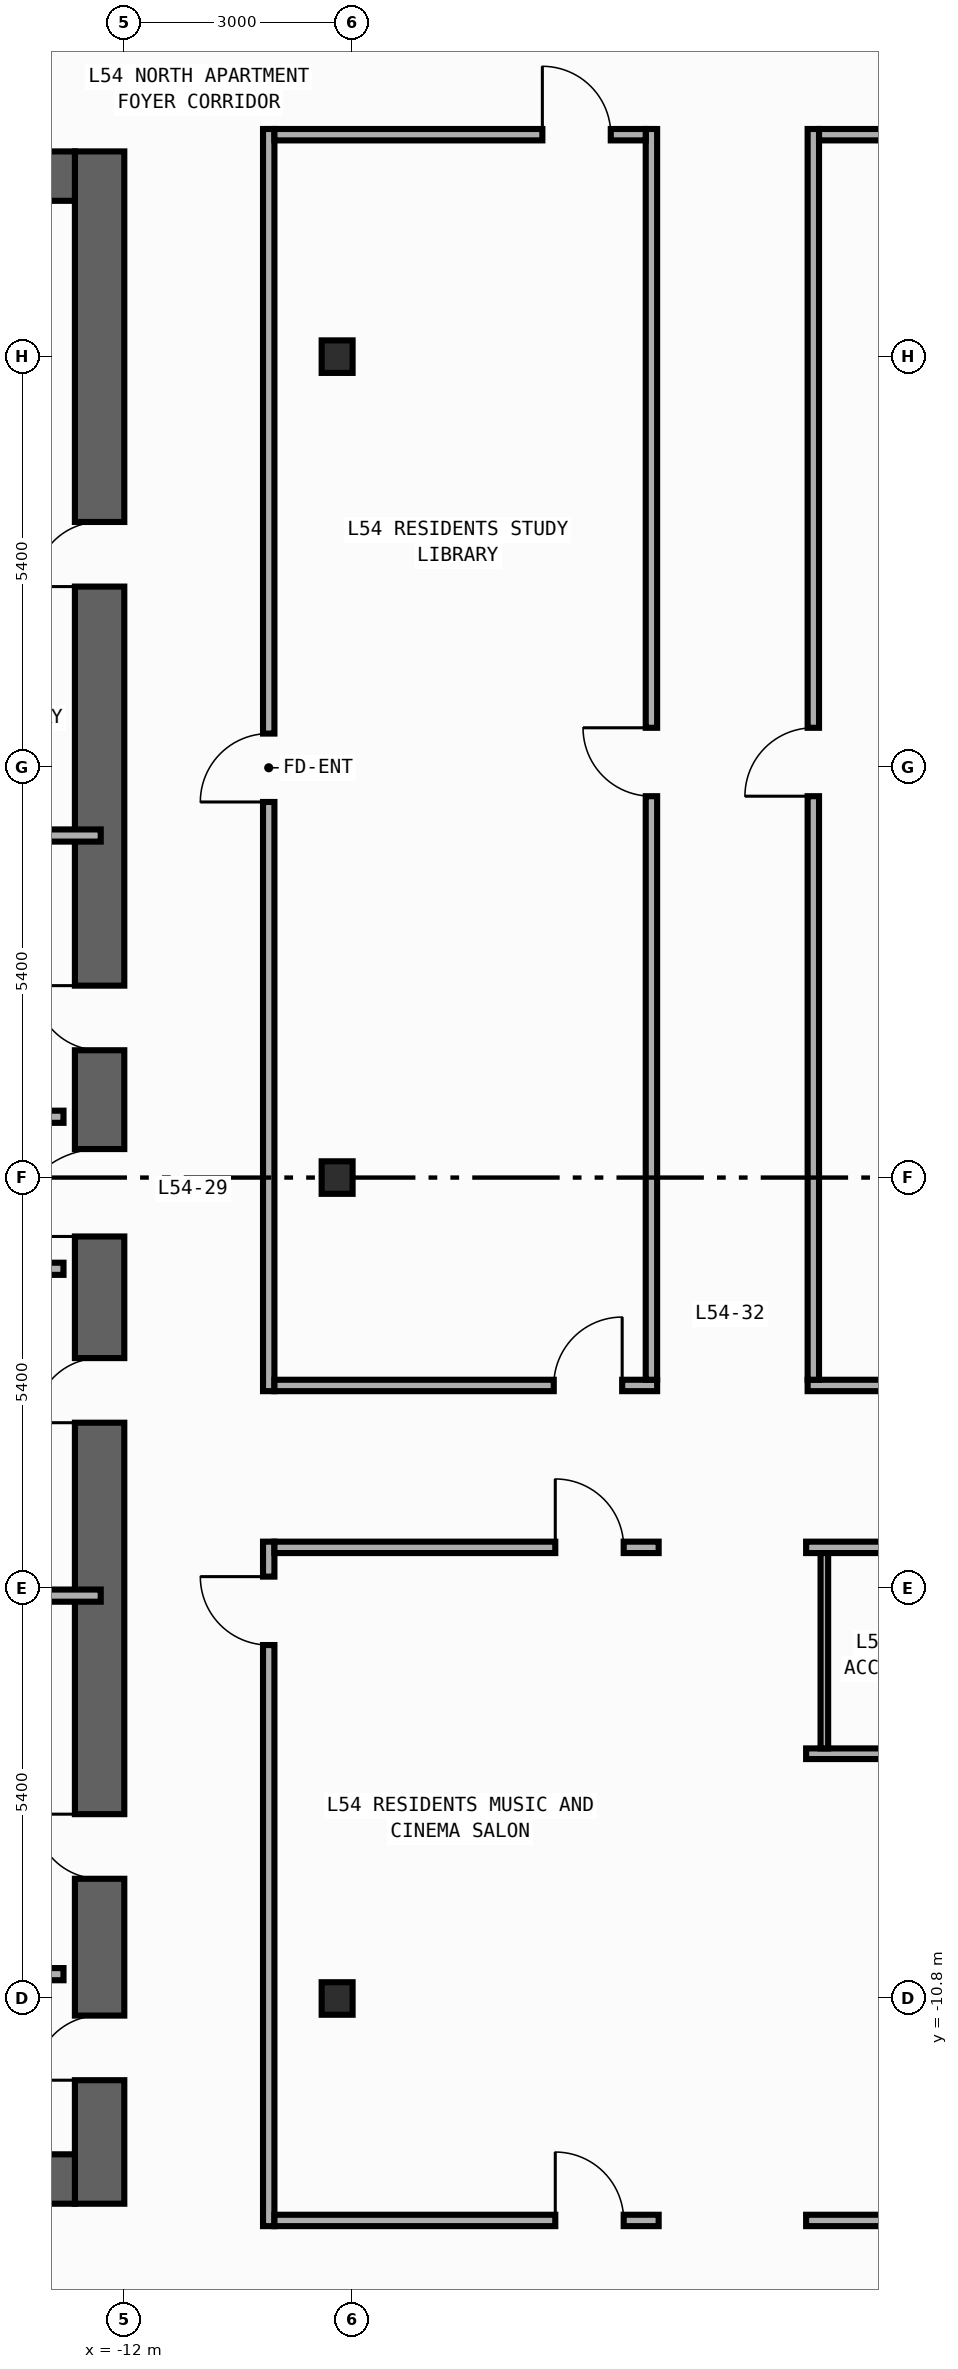
"""IFC4 building model, lengths in metres.
Left out: names, types, materials, properties, quantities, classifications, styles, units other than length and angle.
Written with IfcOpenShell. Run it as: python <this file> out.ifc"""

import sys

from ifc_helpers import new_model, si_unit, direction, frame, frame_2d, origin, origin_2d, place, context, subcontext, project, spatial, rectangle, i_section, extrude, element, fill, save


model = new_model("IFC4")
c1 = context("Model", 3, precision=1e-05, world=origin(), true_north=direction((0.0, 1.0)))
c2 = subcontext(c1, "Body", "Model", "MODEL_VIEW")
j1 = project(units=[si_unit("LENGTHUNIT", "METRE"), si_unit("PLANEANGLEUNIT", "RADIAN")], contexts=[c1])
p1 = place(None, origin())
s1 = spatial("IfcSite", under=j1, at=p1, CompositionType="ELEMENT")
p2 = place(p1, origin())
s2 = spatial("IfcBuilding", under=s1, at=p2, CompositionType="ELEMENT")
p3 = place(p2, frame((0.0, 0.0, 233.2)))
s3 = spatial("IfcBuildingStorey", under=s2, at=p3, CompositionType="ELEMENT", Elevation=233.2)
p4 = place(p3, frame((-12.325, -13.5, 0.0), z_axis=(0.0, 0.0, 1.0), x_axis=(0.0, 1.0, 0.0)))
e1 = element("IfcWall", 1, at=p4, inside=s3, PredefinedType="SHEAR", context=c2, shape_type="SweptSolid", body=[
    extrude(rectangle(XDim=27.0, YDim=0.65, at=frame_2d((13.5, 0.0))), origin(), (0.0, 0.0, 1.0), 3.34),
])
p5 = place(p4, frame((15.175, 0.0, 0.0)))
e2 = element("IfcOpeningElement", 2, at=p5, cuts=e1, PredefinedType="OPENING", context=c2, shape_type="SweptSolid", body=[
    extrude(rectangle(XDim=0.85, YDim=2.1, at=frame_2d((0.425, 1.05))), frame((0.0, 0.335, 0.0), z_axis=(0.0, -1.0, 0.0), x_axis=(1.0, 0.0, 0.0)), (0.0, 0.0, 1.0), 0.67),
])
p6 = place(p4, frame((21.275, 0.0, 0.0)))
e3 = element("IfcOpeningElement", 3, at=p6, cuts=e1, PredefinedType="OPENING", context=c2, shape_type="SweptSolid", body=[
    extrude(rectangle(XDim=0.85, YDim=2.1, at=frame_2d((0.425, 1.05))), frame((0.0, 0.335, 0.0), z_axis=(0.0, -1.0, 0.0), x_axis=(1.0, 0.0, 0.0)), (0.0, 0.0, 1.0), 0.67),
])
p7 = place(p4, frame((4.275, 0.0, 0.0)))
e4 = element("IfcOpeningElement", 4, at=p7, cuts=e1, PredefinedType="OPENING", context=c2, shape_type="SweptSolid", body=[
    extrude(rectangle(XDim=0.85, YDim=2.1, at=frame_2d((0.425, 1.05))), frame((0.0, 0.335, 0.0), z_axis=(0.0, -1.0, 0.0), x_axis=(1.0, 0.0, 0.0)), (0.0, 0.0, 1.0), 0.67),
])
p8 = place(p4, frame((10.275, 0.0, 0.0)))
e5 = element("IfcOpeningElement", 5, at=p8, cuts=e1, PredefinedType="OPENING", context=c2, shape_type="SweptSolid", body=[
    extrude(rectangle(XDim=0.85, YDim=2.1, at=frame_2d((0.425, 1.05))), frame((0.0, 0.335, 0.0), z_axis=(0.0, -1.0, 0.0), x_axis=(1.0, 0.0, 0.0)), (0.0, 0.0, 1.0), 0.67),
])
p9 = place(p4, frame((12.725, 0.0, 0.0)))
e6 = element("IfcOpeningElement", 6, at=p9, cuts=e1, PredefinedType="OPENING", context=c2, shape_type="SweptSolid", body=[
    extrude(rectangle(XDim=1.15, YDim=2.2, at=frame_2d((0.575, 1.1))), frame((0.0, 0.335, 0.0), z_axis=(0.0, -1.0, 0.0), x_axis=(1.0, 0.0, 0.0)), (0.0, 0.0, 1.0), 0.67),
])
p10 = place(p4, frame((1.625, 0.0, 0.0)))
e7 = element("IfcOpeningElement", 7, at=p10, cuts=e1, PredefinedType="OPENING", context=c2, shape_type="SweptSolid", body=[
    extrude(rectangle(XDim=0.85, YDim=2.1, at=frame_2d((0.425, 1.05))), frame((0.0, 0.335, 0.0), z_axis=(0.0, -1.0, 0.0), x_axis=(1.0, 0.0, 0.0)), (0.0, 0.0, 1.0), 0.67),
])
for number, where, z_axis, x_axis in (
    (8, (-19.75, -13.175, 0.0), (0.0, 0.0, 1.0), (1.0, 0.0, 0.0)),
    (9, (-19.75, 13.175, 0.0), (0.0, 0.0, 1.0), (1.0, 0.0, 0.0)),
):
    element("IfcWall", number, at=place(p3, frame(where, z_axis=z_axis, x_axis=x_axis)), inside=s3, PredefinedType="SHEAR", context=c2, shape_type="SweptSolid", body=[
        extrude(rectangle(XDim=7.1, YDim=0.65, at=frame_2d((3.55, 0.0))), origin(), (0.0, 0.0, 1.0), 3.34),
    ])
for number, where, z_axis, x_axis in (
    (10, (-9.2, -10.8, 0.0), (0.0, 0.0, 1.0), (1.0, 0.0, 0.0)),
    (11, (-9.2, 0.0, 0.0), (0.0, 0.0, 1.0), (1.0, 0.0, 0.0)),
    (12, (-9.2, 10.8, 0.0), (0.0, 0.0, 1.0), (1.0, 0.0, 0.0)),
):
    element("IfcColumn", number, at=place(p3, frame(where, z_axis=z_axis, x_axis=x_axis)), inside=s3, PredefinedType="COLUMN", context=c2, shape_type="SweptSolid", body=[
        extrude(i_section(OverallWidth=0.407, OverallDepth=0.428, WebThickness=0.02, FlangeThickness=0.035, FilletRadius=0.022, at=origin_2d()), origin(), (0.0, 0.0, 1.0), 3.6),
    ])
for number, where, z_axis, x_axis in (
    (13, (-15.4, 0.8, 0.0), (0.0, 0.0, 1.0), (1.0, 0.0, 0.0)),
    (14, (-15.4, -1.2, 0.0), (0.0, 0.0, 1.0), (1.0, 0.0, 0.0)),
    (15, (-15.4, -10.48, 0.0), (0.0, 0.0, 1.0), (1.0, 0.0, 0.0)),
):
    element("IfcWall", number, at=place(p3, frame(where, z_axis=z_axis, x_axis=x_axis)), inside=s3, PredefinedType="STANDARD", context=c2, shape_type="SweptSolid", body=[
        extrude(rectangle(XDim=2.6, YDim=0.16, at=frame_2d((1.3, 0.0))), origin(), (0.0, 0.0, 1.0), 3.34),
    ])
for number, where, z_axis, x_axis in (
    (16, (-15.375, 4.5, 0.0), (0.0, 0.0, 1.0), (1.0, 0.0, 0.0)),
    (17, (-15.375, -5.5, 0.0), (0.0, 0.0, 1.0), (1.0, 0.0, 0.0)),
):
    element("IfcWall", number, at=place(p3, frame(where, z_axis=z_axis, x_axis=x_axis)), inside=s3, PredefinedType="PARTITIONING", context=c2, shape_type="SweptSolid", body=[
        extrude(rectangle(XDim=3.065, YDim=0.16, at=frame_2d((1.532, 0.0))), origin(), (0.0, 0.0, 1.0), 3.34),
    ])
p11 = place(p3, frame((-10.1, -2.81, 0.0), z_axis=(0.0, 0.0, 1.0), x_axis=(0.0, 1.0, 0.0)))
e18 = element("IfcWall", 18, at=p11, inside=s3, PredefinedType="PARTITIONING", context=c2, shape_type="SweptSolid", body=[
    extrude(rectangle(XDim=16.605, YDim=0.15, at=frame_2d((8.302, 0.0))), origin(), (0.0, 0.0, 1.0), 3.34),
])
p12 = place(p11, frame((7.751, 0.0, 0.0)))
e19 = element("IfcOpeningElement", 19, at=p12, cuts=e18, PredefinedType="OPENING", context=c2, shape_type="SweptSolid", body=[
    extrude(rectangle(XDim=0.9, YDim=2.15, at=frame_2d((0.45, 1.075))), frame((0.0, 0.085, 0.0), z_axis=(0.0, -1.0, 0.0), x_axis=(1.0, 0.0, 0.0)), (0.0, 0.0, 1.0), 0.17),
])
p13 = place(p3, frame((-10.1, -13.795, 0.0), z_axis=(0.0, 0.0, 1.0), x_axis=(0.0, 1.0, 0.0)))
e20 = element("IfcWall", 20, at=p13, inside=s3, PredefinedType="PARTITIONING", context=c2, shape_type="SweptSolid", body=[
    extrude(rectangle(XDim=9.005, YDim=0.15, at=frame_2d((4.502, 0.0))), origin(), (0.0, 0.0, 1.0), 3.34),
])
p14 = place(p13, frame((7.645, 0.0, 0.0)))
e21 = element("IfcOpeningElement", 21, at=p14, cuts=e20, PredefinedType="OPENING", context=c2, shape_type="SweptSolid", body=[
    extrude(rectangle(XDim=0.9, YDim=2.15, at=frame_2d((0.45, 1.075))), frame((0.0, 0.085, 0.0), z_axis=(0.0, -1.0, 0.0), x_axis=(1.0, 0.0, 0.0)), (0.0, 0.0, 1.0), 0.17),
])
p15 = place(p3, frame((-10.025, -2.735, 0.0), z_axis=(0.0, 0.0, 1.0), x_axis=(1.0, 0.0, 0.0)))
e22 = element("IfcWall", 22, at=p15, inside=s3, PredefinedType="PARTITIONING", context=c2, shape_type="SweptSolid", body=[
    extrude(rectangle(XDim=5.035, YDim=0.15, at=frame_2d((2.518, 0.0))), origin(), (0.0, 0.0, 1.0), 3.34),
])
p16 = place(p15, frame((3.675, 0.0, 0.0)))
e23 = element("IfcOpeningElement", 23, at=p16, cuts=e22, PredefinedType="OPENING", context=c2, shape_type="SweptSolid", body=[
    extrude(rectangle(XDim=0.9, YDim=2.15, at=frame_2d((0.45, 1.075))), frame((0.0, 0.085, 0.0), z_axis=(0.0, -1.0, 0.0), x_axis=(1.0, 0.0, 0.0)), (0.0, 0.0, 1.0), 0.17),
])
p17 = place(p3, frame((-10.025, -4.865, 0.0), z_axis=(0.0, 0.0, 1.0), x_axis=(1.0, 0.0, 0.0)))
e24 = element("IfcWall", 24, at=p17, inside=s3, PredefinedType="PARTITIONING", context=c2, shape_type="SweptSolid", body=[
    extrude(rectangle(XDim=5.055, YDim=0.15, at=frame_2d((2.527, 0.0))), origin(), (0.0, 0.0, 1.0), 3.34),
])
p18 = place(p17, frame((3.695, 0.0, 0.0)))
e25 = element("IfcOpeningElement", 25, at=p18, cuts=e24, PredefinedType="OPENING", context=c2, shape_type="SweptSolid", body=[
    extrude(rectangle(XDim=0.9, YDim=2.15, at=frame_2d((0.45, 1.075))), frame((0.0, 0.085, 0.0), z_axis=(0.0, -1.0, 0.0), x_axis=(1.0, 0.0, 0.0)), (0.0, 0.0, 1.0), 0.17),
])
p19 = place(p3, frame((-3.01, -2.735, 0.0), z_axis=(0.0, 0.0, 1.0), x_axis=(1.0, 0.0, 0.0)))
e26 = element("IfcWall", 26, at=p19, inside=s3, PredefinedType="PARTITIONING", context=c2, shape_type="SweptSolid", body=[
    extrude(rectangle(XDim=13.035, YDim=0.15, at=frame_2d((6.518, 0.0))), origin(), (0.0, 0.0, 1.0), 3.34),
])
p20 = place(p19, frame((2.463, 0.0, 0.0)))
e27 = element("IfcOpeningElement", 27, at=p20, cuts=e26, PredefinedType="OPENING", context=c2, shape_type="SweptSolid", body=[
    extrude(rectangle(XDim=0.9, YDim=2.15, at=frame_2d((0.45, 1.075))), frame((0.0, 0.085, 0.0), z_axis=(0.0, -1.0, 0.0), x_axis=(1.0, 0.0, 0.0)), (0.0, 0.0, 1.0), 0.17),
])
p21 = place(p3, frame((-3.03, -4.865, 0.0), z_axis=(0.0, 0.0, 1.0), x_axis=(1.0, 0.0, 0.0)))
e28 = element("IfcWall", 28, at=p21, inside=s3, PredefinedType="PARTITIONING", context=c2, shape_type="SweptSolid", body=[
    extrude(rectangle(XDim=3.07, YDim=0.15, at=frame_2d((1.535, 0.0))), origin(), (0.0, 0.0, 1.0), 3.34),
])
p22 = place(p21, frame((1.71, 0.0, 0.0)))
e29 = element("IfcOpeningElement", 29, at=p22, cuts=e28, PredefinedType="OPENING", context=c2, shape_type="SweptSolid", body=[
    extrude(rectangle(XDim=0.9, YDim=2.15, at=frame_2d((0.45, 1.075))), frame((0.0, 0.085, 0.0), z_axis=(0.0, -1.0, 0.0), x_axis=(1.0, 0.0, 0.0)), (0.0, 0.0, 1.0), 0.17),
])
p23 = place(p3, frame((-5.065, -2.66, 0.0), z_axis=(0.0, 0.0, 1.0), x_axis=(0.0, 1.0, 0.0)))
e30 = element("IfcWall", 30, at=p23, inside=s3, PredefinedType="PARTITIONING", context=c2, shape_type="SweptSolid", body=[
    extrude(rectangle(XDim=16.455, YDim=0.15, at=frame_2d((8.228, 0.0))), origin(), (0.0, 0.0, 1.0), 2.99),
])
p24 = place(p23, frame((7.677, 0.0, 0.0)))
e31 = element("IfcOpeningElement", 31, at=p24, cuts=e30, PredefinedType="OPENING", context=c2, shape_type="SweptSolid", body=[
    extrude(rectangle(XDim=0.9, YDim=2.15, at=frame_2d((0.45, 1.075))), frame((0.0, 0.085, 0.0), z_axis=(0.0, -1.0, 0.0), x_axis=(1.0, 0.0, 0.0)), (0.0, 0.0, 1.0), 0.17),
])
p25 = place(p3, frame((-2.935, -2.66, 0.0), z_axis=(0.0, 0.0, 1.0), x_axis=(0.0, 1.0, 0.0)))
e32 = element("IfcWall", 32, at=p25, inside=s3, PredefinedType="PARTITIONING", context=c2, shape_type="SweptSolid", body=[
    extrude(rectangle(XDim=16.455, YDim=0.15, at=frame_2d((8.228, 0.0))), origin(), (0.0, 0.0, 1.0), 3.34),
])
p26 = place(p25, frame((7.677, 0.0, 0.0)))
e33 = element("IfcOpeningElement", 33, at=p26, cuts=e32, PredefinedType="OPENING", context=c2, shape_type="SweptSolid", body=[
    extrude(rectangle(XDim=0.9, YDim=2.15, at=frame_2d((0.45, 1.075))), frame((0.0, 0.085, 0.0), z_axis=(0.0, -1.0, 0.0), x_axis=(1.0, 0.0, 0.0)), (0.0, 0.0, 1.0), 0.17),
])
p27 = place(p3, frame((-10.025, 13.72, 0.0), z_axis=(0.0, 0.0, 1.0), x_axis=(1.0, 0.0, 0.0)))
e34 = element("IfcWall", 34, at=p27, inside=s3, PredefinedType="PARTITIONING", context=c2, shape_type="SweptSolid", body=[
    extrude(rectangle(XDim=4.885, YDim=0.15, at=frame_2d((2.442, 0.0))), origin(), (0.0, 0.0, 1.0), 3.34),
])
p28 = place(p27, frame((3.525, 0.0, 0.0)))
e35 = element("IfcOpeningElement", 35, at=p28, cuts=e34, PredefinedType="OPENING", context=c2, shape_type="SweptSolid", body=[
    extrude(rectangle(XDim=0.9, YDim=2.15, at=frame_2d((0.45, 1.075))), frame((0.0, 0.085, 0.0), z_axis=(0.0, -1.0, 0.0), x_axis=(1.0, 0.0, 0.0)), (0.0, 0.0, 1.0), 0.17),
])
p29 = place(p3, frame((-2.86, 13.72, 0.0), z_axis=(0.0, 0.0, 1.0), x_axis=(1.0, 0.0, 0.0)))
e36 = element("IfcWall", 36, at=p29, inside=s3, PredefinedType="PARTITIONING", context=c2, shape_type="SweptSolid", body=[
    extrude(rectangle(XDim=12.885, YDim=0.15, at=frame_2d((6.442, 0.0))), origin(), (0.0, 0.0, 1.0), 3.34),
])
p30 = place(p29, frame((4.685, 0.0, 0.0)))
e37 = element("IfcOpeningElement", 37, at=p30, cuts=e36, PredefinedType="OPENING", context=c2, shape_type="SweptSolid", body=[
    extrude(rectangle(XDim=0.9, YDim=2.15, at=frame_2d((0.45, 1.075))), frame((0.0, 0.085, 0.0), z_axis=(0.0, -1.0, 0.0), x_axis=(1.0, 0.0, 0.0)), (0.0, 0.0, 1.0), 0.17),
])
p31 = place(p3, frame((-10.025, -13.72, 0.0), z_axis=(0.0, 0.0, 1.0), x_axis=(1.0, 0.0, 0.0)))
e38 = element("IfcWall", 38, at=p31, inside=s3, PredefinedType="PARTITIONING", context=c2, shape_type="SweptSolid", body=[
    extrude(rectangle(XDim=5.055, YDim=0.15, at=frame_2d((2.527, 0.0))), origin(), (0.0, 0.0, 1.0), 3.34),
])
p32 = place(p31, frame((3.695, 0.0, 0.0)))
e39 = element("IfcOpeningElement", 39, at=p32, cuts=e38, PredefinedType="OPENING", context=c2, shape_type="SweptSolid", body=[
    extrude(rectangle(XDim=0.9, YDim=2.15, at=frame_2d((0.45, 1.075))), frame((0.0, 0.085, 0.0), z_axis=(0.0, -1.0, 0.0), x_axis=(1.0, 0.0, 0.0)), (0.0, 0.0, 1.0), 0.17),
])
p33 = place(p3, frame((-3.03, -13.72, 0.0), z_axis=(0.0, 0.0, 1.0), x_axis=(1.0, 0.0, 0.0)))
e40 = element("IfcWall", 40, at=p33, inside=s3, PredefinedType="PARTITIONING", context=c2, shape_type="SweptSolid", body=[
    extrude(rectangle(XDim=13.055, YDim=0.15, at=frame_2d((6.527, 0.0))), origin(), (0.0, 0.0, 1.0), 3.34),
])
p34 = place(p33, frame((4.874, 0.0, 0.0)))
e41 = element("IfcOpeningElement", 41, at=p34, cuts=e40, PredefinedType="OPENING", context=c2, shape_type="SweptSolid", body=[
    extrude(rectangle(XDim=0.9, YDim=2.15, at=frame_2d((0.45, 1.075))), frame((0.0, 0.085, 0.0), z_axis=(0.0, -1.0, 0.0), x_axis=(1.0, 0.0, 0.0)), (0.0, 0.0, 1.0), 0.17),
])
p35 = place(p3, frame((-3.03, -7.58, 0.0), z_axis=(0.0, 0.0, 1.0), x_axis=(1.0, 0.0, 0.0)))
e42 = element("IfcWall", 42, at=p35, inside=s3, PredefinedType="PARTITIONING", context=c2, shape_type="SweptSolid", body=[
    extrude(rectangle(XDim=3.07, YDim=0.14, at=frame_2d((1.535, 0.0))), origin(), (0.0, 0.0, 1.0), 3.34),
])
p36 = place(p3, frame((-2.79, -7.51, 0.0), z_axis=(0.0, 0.0, 1.0), x_axis=(0.0, 1.0, 0.0)))
e43 = element("IfcWall", 43, at=p36, inside=s3, PredefinedType="PARTITIONING", context=c2, shape_type="SweptSolid", body=[
    extrude(rectangle(XDim=2.57, YDim=0.1, at=frame_2d((1.285, 0.0))), origin(), (0.0, 0.0, 1.0), 3.34),
])
p37 = place(p5, origin())
e44 = element("IfcDoor", 44, at=p37, inside=s3, OperationType="SINGLE_SWING_RIGHT", PredefinedType="DOOR", context=c2, shape_type="SweptSolid", body=[
    extrude(rectangle(XDim=0.85, YDim=2.1, at=frame_2d((0.425, 1.05))), frame((0.0, 0.025, 0.0), z_axis=(0.0, -1.0, 0.0), x_axis=(1.0, 0.0, 0.0)), (0.0, 0.0, 1.0), 0.05),
])
fill(e2, e44)
p38 = place(p6, origin())
e45 = element("IfcDoor", 45, at=p38, inside=s3, OperationType="SINGLE_SWING_LEFT", PredefinedType="DOOR", context=c2, shape_type="SweptSolid", body=[
    extrude(rectangle(XDim=0.85, YDim=2.1, at=frame_2d((0.425, 1.05))), frame((0.0, 0.025, 0.0), z_axis=(0.0, -1.0, 0.0), x_axis=(1.0, 0.0, 0.0)), (0.0, 0.0, 1.0), 0.05),
])
fill(e3, e45)
p39 = place(p7, origin())
e46 = element("IfcDoor", 46, at=p39, inside=s3, OperationType="SINGLE_SWING_RIGHT", PredefinedType="DOOR", context=c2, shape_type="SweptSolid", body=[
    extrude(rectangle(XDim=0.85, YDim=2.1, at=frame_2d((0.425, 1.05))), frame((0.0, 0.025, 0.0), z_axis=(0.0, -1.0, 0.0), x_axis=(1.0, 0.0, 0.0)), (0.0, 0.0, 1.0), 0.05),
])
fill(e4, e46)
p40 = place(p8, origin())
e47 = element("IfcDoor", 47, at=p40, inside=s3, OperationType="SINGLE_SWING_LEFT", PredefinedType="DOOR", context=c2, shape_type="SweptSolid", body=[
    extrude(rectangle(XDim=0.85, YDim=2.1, at=frame_2d((0.425, 1.05))), frame((0.0, 0.025, 0.0), z_axis=(0.0, -1.0, 0.0), x_axis=(1.0, 0.0, 0.0)), (0.0, 0.0, 1.0), 0.05),
])
fill(e5, e47)
p41 = place(p9, origin())
e48 = element("IfcDoor", 48, at=p41, inside=s3, OperationType="SINGLE_SWING_LEFT", PredefinedType="DOOR", context=c2, shape_type="SweptSolid", body=[
    extrude(rectangle(XDim=1.15, YDim=2.2, at=frame_2d((0.575, 1.1))), frame((0.0, 0.025, 0.0), z_axis=(0.0, -1.0, 0.0), x_axis=(1.0, 0.0, 0.0)), (0.0, 0.0, 1.0), 0.05),
])
fill(e6, e48)
p42 = place(p10, origin())
e49 = element("IfcDoor", 49, at=p42, inside=s3, OperationType="SINGLE_SWING_LEFT", PredefinedType="DOOR", context=c2, shape_type="SweptSolid", body=[
    extrude(rectangle(XDim=0.85, YDim=2.1, at=frame_2d((0.425, 1.05))), frame((0.0, 0.025, 0.0), z_axis=(0.0, -1.0, 0.0), x_axis=(1.0, 0.0, 0.0)), (0.0, 0.0, 1.0), 0.05),
])
fill(e7, e49)
p43 = place(p12, origin())
e50 = element("IfcDoor", 50, at=p43, inside=s3, OperationType="SINGLE_SWING_LEFT", PredefinedType="DOOR", context=c2, shape_type="SweptSolid", body=[
    extrude(rectangle(XDim=0.9, YDim=2.15, at=frame_2d((0.45, 1.075))), frame((0.0, 0.025, 0.0), z_axis=(0.0, -1.0, 0.0), x_axis=(1.0, 0.0, 0.0)), (0.0, 0.0, 1.0), 0.05),
])
fill(e19, e50)
p44 = place(p14, origin())
e51 = element("IfcDoor", 51, at=p44, inside=s3, OperationType="SINGLE_SWING_RIGHT", PredefinedType="DOOR", context=c2, shape_type="SweptSolid", body=[
    extrude(rectangle(XDim=0.9, YDim=2.15, at=frame_2d((0.45, 1.075))), frame((0.0, 0.025, 0.0), z_axis=(0.0, -1.0, 0.0), x_axis=(1.0, 0.0, 0.0)), (0.0, 0.0, 1.0), 0.05),
])
fill(e21, e51)
p45 = place(p16, origin())
e52 = element("IfcDoor", 52, at=p45, inside=s3, OperationType="SINGLE_SWING_RIGHT", PredefinedType="DOOR", context=c2, shape_type="SweptSolid", body=[
    extrude(rectangle(XDim=0.9, YDim=2.15, at=frame_2d((0.45, 1.075))), frame((0.0, 0.025, 0.0), z_axis=(0.0, -1.0, 0.0), x_axis=(1.0, 0.0, 0.0)), (0.0, 0.0, 1.0), 0.05),
])
fill(e23, e52)
p46 = place(p18, origin())
e53 = element("IfcDoor", 53, at=p46, inside=s3, OperationType="SINGLE_SWING_LEFT", PredefinedType="DOOR", context=c2, shape_type="SweptSolid", body=[
    extrude(rectangle(XDim=0.9, YDim=2.15, at=frame_2d((0.45, 1.075))), frame((0.0, 0.025, 0.0), z_axis=(0.0, -1.0, 0.0), x_axis=(1.0, 0.0, 0.0)), (0.0, 0.0, 1.0), 0.05),
])
fill(e25, e53)
p47 = place(p24, origin())
e54 = element("IfcDoor", 54, at=p47, inside=s3, OperationType="SINGLE_SWING_RIGHT", PredefinedType="DOOR", context=c2, shape_type="SweptSolid", body=[
    extrude(rectangle(XDim=0.9, YDim=2.15, at=frame_2d((0.45, 1.075))), frame((0.0, 0.025, 0.0), z_axis=(0.0, -1.0, 0.0), x_axis=(1.0, 0.0, 0.0)), (0.0, 0.0, 1.0), 0.05),
])
fill(e31, e54)
p48 = place(p26, origin())
e55 = element("IfcDoor", 55, at=p48, inside=s3, OperationType="SINGLE_SWING_LEFT", PredefinedType="DOOR", context=c2, shape_type="SweptSolid", body=[
    extrude(rectangle(XDim=0.9, YDim=2.15, at=frame_2d((0.45, 1.075))), frame((0.0, 0.025, 0.0), z_axis=(0.0, -1.0, 0.0), x_axis=(1.0, 0.0, 0.0)), (0.0, 0.0, 1.0), 0.05),
])
fill(e33, e55)
p49 = place(p28, origin())
e56 = element("IfcDoor", 56, at=p49, inside=s3, OperationType="SINGLE_SWING_LEFT", PredefinedType="DOOR", context=c2, shape_type="SweptSolid", body=[
    extrude(rectangle(XDim=0.9, YDim=2.15, at=frame_2d((0.45, 1.075))), frame((0.0, 0.025, 0.0), z_axis=(0.0, -1.0, 0.0), x_axis=(1.0, 0.0, 0.0)), (0.0, 0.0, 1.0), 0.05),
])
fill(e35, e56)
p50 = place(p32, origin())
e57 = element("IfcDoor", 57, at=p50, inside=s3, OperationType="SINGLE_SWING_LEFT", PredefinedType="DOOR", context=c2, shape_type="SweptSolid", body=[
    extrude(rectangle(XDim=0.9, YDim=2.15, at=frame_2d((0.45, 1.075))), frame((0.0, 0.025, 0.0), z_axis=(0.0, -1.0, 0.0), x_axis=(1.0, 0.0, 0.0)), (0.0, 0.0, 1.0), 0.05),
])
fill(e39, e57)
save(model, sys.argv[1])
